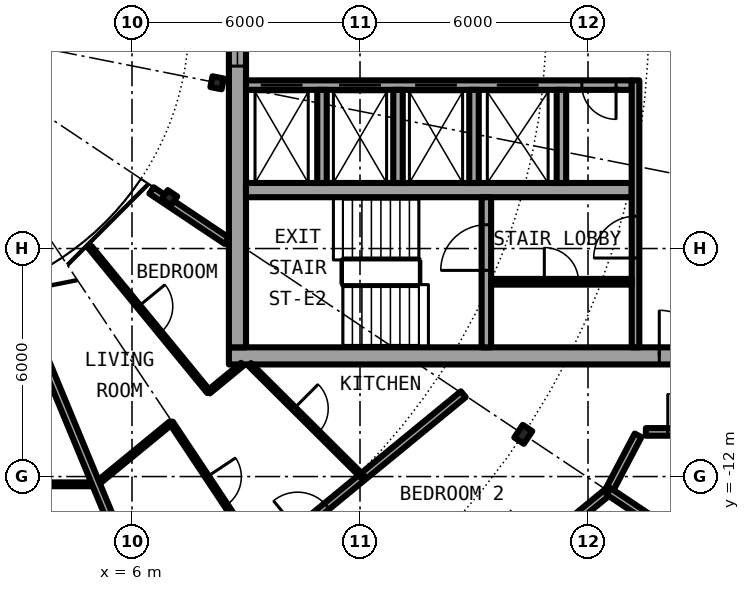
"""IFC4 building model, lengths in metres.
Left out: names, types, materials, properties, quantities, classifications, styles, units other than length and angle.
Written with IfcOpenShell. Run it as: python <this file> out.ifc"""

import sys

from ifc_helpers import new_model, si_unit, direction, frame, frame_2d, origin, origin_2d, place, context, subcontext, project, spatial, rectangle, i_section, extrude, element, fill, save


model = new_model("IFC4")
c1 = context("Model", 3, precision=1e-05, world=origin(), true_north=direction((0.0, 1.0)))
c2 = subcontext(c1, "Body", "Model", "MODEL_VIEW")
j1 = project(units=[si_unit("LENGTHUNIT", "METRE"), si_unit("PLANEANGLEUNIT", "RADIAN")], contexts=[c1])
p1 = place(None, origin())
s1 = spatial("IfcSite", under=j1, at=p1, CompositionType="ELEMENT")
p2 = place(p1, origin())
s2 = spatial("IfcBuilding", under=s1, at=p2, CompositionType="ELEMENT")
p3 = place(p2, frame((0.0, 0.0, 199.35)))
s3 = spatial("IfcBuildingStorey", under=s2, at=p3, CompositionType="ELEMENT", Elevation=199.35)
p4 = place(p3, frame((16.297, -10.889, 0.0), z_axis=(0.0, 0.0, 1.0), x_axis=(0.831469612303, -0.55557023302, 0.0)))
e1 = element("IfcColumn", 1, at=p4, inside=s3, PredefinedType="COLUMN", context=c2, shape_type="SweptSolid", body=[
    extrude(i_section(OverallWidth=0.3, OverallDepth=0.4, WebThickness=0.013, FlangeThickness=0.024, FilletRadius=0.027, at=origin_2d()), origin(), (0.0, 0.0, 1.0), 3.05),
])
for number, where, z_axis, x_axis in (
    (2, (6.984, -4.667, 0.0), (0.0, 0.0, 1.0), (0.831, -0.556, 0.0)),
    (3, (8.239, -1.639, 0.0), (0.0, 0.0, 1.0), (0.981, -0.195, 0.0)),
):
    element("IfcColumn", number, at=place(p3, frame(where, z_axis=z_axis, x_axis=x_axis)), inside=s3, PredefinedType="COLUMN", context=c2, shape_type="SweptSolid", body=[
        extrude(i_section(OverallWidth=0.3, OverallDepth=0.29, WebThickness=0.009, FlangeThickness=0.014, FilletRadius=0.027, at=origin_2d()), origin(), (0.0, 0.0, 1.0), 3.05),
    ])
p5 = place(p3, frame((8.55, -8.825, 0.0), z_axis=(0.0, 0.0, 1.0), x_axis=(1.0, 0.0, 0.0)))
e4 = element("IfcWall", 4, at=p5, inside=s3, PredefinedType="SHEAR", context=c2, shape_type="SweptSolid", body=[
    extrude(rectangle(XDim=13.5, YDim=0.45, at=frame_2d((6.75, 0.0))), origin(), (0.0, 0.0, 1.0), 3.05),
])
p6 = place(p5, frame((11.325, 0.0, 0.0)))
e5 = element("IfcOpeningElement", 5, at=p6, cuts=e4, PredefinedType="OPENING", context=c2, shape_type="SweptSolid", body=[
    extrude(rectangle(XDim=1.2, YDim=2.3, at=frame_2d((0.6, 1.15))), frame((0.0, 0.235, 0.0), z_axis=(0.0, -1.0, 0.0), x_axis=(1.0, 0.0, 0.0)), (0.0, 0.0, 1.0), 0.47),
])
p7 = place(p3, frame((8.775, -8.6, 0.0), z_axis=(0.0, 0.0, 1.0), x_axis=(0.0, 1.0, 0.0)))
e6 = element("IfcWall", 6, at=p7, inside=s3, PredefinedType="SHEAR", context=c2, shape_type="SweptSolid", body=[
    extrude(rectangle(XDim=17.2, YDim=0.45, at=frame_2d((8.6, 0.0))), origin(), (0.0, 0.0, 1.0), 3.05),
])
p8 = place(p7, frame((7.4, 0.0, 0.1)))
e7 = element("IfcOpeningElement", 7, at=p8, cuts=e6, PredefinedType="OPENING", context=c2, shape_type="SweptSolid", body=[
    extrude(rectangle(XDim=2.4, YDim=2.2, at=frame_2d((1.2, 1.1))), frame((0.0, 0.235, 0.0), z_axis=(0.0, -1.0, 0.0), x_axis=(1.0, 0.0, 0.0)), (0.0, 0.0, 1.0), 0.47),
])
p9 = place(p3, frame((19.15, -1.7, 0.0), z_axis=(0.0, 0.0, 1.0), x_axis=(-1.0, 0.0, 0.0)))
e8 = element("IfcWall", 8, at=p9, inside=s3, PredefinedType="SHEAR", context=c2, shape_type="SweptSolid", body=[
    extrude(rectangle(XDim=10.15, YDim=0.25, at=frame_2d((5.075, 0.0))), origin(), (0.0, 0.0, 1.0), 3.05),
])
p10 = place(p9, frame((8.663, 0.0, 0.0)))
e9 = element("IfcOpeningElement", 9, at=p10, cuts=e8, PredefinedType="OPENING", context=c2, shape_type="SweptSolid", body=[
    extrude(rectangle(XDim=1.1, YDim=2.3, at=frame_2d((0.55, 1.15))), frame((0.0, 0.135, 0.0), z_axis=(0.0, -1.0, 0.0), x_axis=(1.0, 0.0, 0.0)), (0.0, 0.0, 1.0), 0.27),
])
p11 = place(p9, frame((6.6, 0.0, 0.0)))
e10 = element("IfcOpeningElement", 10, at=p11, cuts=e8, PredefinedType="OPENING", context=c2, shape_type="SweptSolid", body=[
    extrude(rectangle(XDim=1.1, YDim=2.3, at=frame_2d((0.55, 1.15))), frame((0.0, 0.135, 0.0), z_axis=(0.0, -1.0, 0.0), x_axis=(1.0, 0.0, 0.0)), (0.0, 0.0, 1.0), 0.27),
])
p12 = place(p9, frame((4.6, 0.0, 0.0)))
e11 = element("IfcOpeningElement", 11, at=p12, cuts=e8, PredefinedType="OPENING", context=c2, shape_type="SweptSolid", body=[
    extrude(rectangle(XDim=1.1, YDim=2.3, at=frame_2d((0.55, 1.15))), frame((0.0, 0.135, 0.0), z_axis=(0.0, -1.0, 0.0), x_axis=(1.0, 0.0, 0.0)), (0.0, 0.0, 1.0), 0.27),
])
p13 = place(p9, frame((2.45, 0.0, 0.0)))
e12 = element("IfcOpeningElement", 12, at=p13, cuts=e8, PredefinedType="OPENING", context=c2, shape_type="SweptSolid", body=[
    extrude(rectangle(XDim=1.1, YDim=2.3, at=frame_2d((0.55, 1.15))), frame((0.0, 0.135, 0.0), z_axis=(0.0, -1.0, 0.0), x_axis=(1.0, 0.0, 0.0)), (0.0, 0.0, 1.0), 0.27),
])
p14 = place(p9, frame((0.413, 0.0, 0.0)))
e13 = element("IfcOpeningElement", 13, at=p14, cuts=e8, PredefinedType="OPENING", context=c2, shape_type="SweptSolid", body=[
    extrude(rectangle(XDim=0.9, YDim=2.3, at=frame_2d((0.45, 1.15))), frame((0.0, 0.135, 0.0), z_axis=(0.0, -1.0, 0.0), x_axis=(1.0, 0.0, 0.0)), (0.0, 0.0, 1.0), 0.27),
])
p15 = place(p3, frame((9.0, -4.462, 0.0), z_axis=(0.0, 0.0, 1.0), x_axis=(1.0, 0.0, 0.0)))
e14 = element("IfcWall", 14, at=p15, inside=s3, PredefinedType="SHEAR", context=c2, shape_type="SweptSolid", body=[
    extrude(rectangle(XDim=10.15, YDim=0.375, at=frame_2d((5.075, 0.0))), origin(), (0.0, 0.0, 1.0), 3.05),
])
p16 = place(p3, frame((15.325, -8.6, 0.0), z_axis=(0.0, 0.0, 1.0), x_axis=(0.0, 1.0, 0.0)))
e15 = element("IfcWall", 15, at=p16, inside=s3, PredefinedType="SHEAR", context=c2, shape_type="SweptSolid", body=[
    extrude(rectangle(XDim=3.95, YDim=0.25, at=frame_2d((1.975, 0.0))), origin(), (0.0, 0.0, 1.0), 3.05),
])
p17 = place(p16, frame((2.025, 0.0, 0.0)))
e16 = element("IfcOpeningElement", 16, at=p17, cuts=e15, PredefinedType="OPENING", context=c2, shape_type="SweptSolid", body=[
    extrude(rectangle(XDim=1.2, YDim=2.3, at=frame_2d((0.6, 1.15))), frame((0.0, 0.135, 0.0), z_axis=(0.0, -1.0, 0.0), x_axis=(1.0, 0.0, 0.0)), (0.0, 0.0, 1.0), 0.27),
])
for number, where, z_axis, x_axis in (
    (17, (15.0, -1.825, 0.0), (0.0, 0.0, 1.0), (0.0, -1.0, 0.0)),
    (18, (17.3, -1.825, 0.0), (0.0, 0.0, 1.0), (0.0, -1.0, 0.0)),
):
    element("IfcWall", number, at=place(p3, frame(where, z_axis=z_axis, x_axis=x_axis)), inside=s3, PredefinedType="SOLIDWALL", context=c2, shape_type="SweptSolid", body=[
        extrude(rectangle(XDim=2.45, YDim=0.25, at=frame_2d((1.225, 0.0))), origin(), (0.0, 0.0, 1.0), 2.7),
    ])
p18 = place(p3, frame((19.25, -8.6, 0.0), z_axis=(0.0, 0.0, 1.0), x_axis=(0.0, 1.0, 0.0)))
e19 = element("IfcWall", 19, at=p18, inside=s3, PredefinedType="SOLIDWALL", context=c2, shape_type="SweptSolid", body=[
    extrude(rectangle(XDim=7.025, YDim=0.2, at=frame_2d((3.513, 0.0))), origin(), (0.0, 0.0, 1.0), 2.7),
])
p19 = place(p18, frame((2.35, 0.0, 0.0)))
e20 = element("IfcOpeningElement", 20, at=p19, cuts=e19, PredefinedType="OPENING", context=c2, shape_type="SweptSolid", body=[
    extrude(rectangle(XDim=1.1, YDim=2.3, at=frame_2d((0.55, 1.15))), frame((0.0, 0.11, 0.0), z_axis=(0.0, -1.0, 0.0), x_axis=(1.0, 0.0, 0.0)), (0.0, 0.0, 1.0), 0.22),
])
for number, where, z_axis, x_axis in (
    (21, (11.0, -1.825, 0.0), (0.0, 0.0, 1.0), (0.0, -1.0, 0.0)),
    (22, (13.0, -1.825, 0.0), (0.0, 0.0, 1.0), (0.0, -1.0, 0.0)),
):
    element("IfcWall", number, at=place(p3, frame(where, z_axis=z_axis, x_axis=x_axis)), inside=s3, PredefinedType="SOLIDWALL", context=c2, shape_type="SweptSolid", body=[
        extrude(rectangle(XDim=2.45, YDim=0.25, at=frame_2d((1.225, 0.0))), origin(), (0.0, 0.0, 1.0), 2.7),
    ])
p20 = place(p3, frame((15.45, -6.875, 0.0), z_axis=(0.0, 0.0, 1.0), x_axis=(1.0, 0.0, 0.0)))
e23 = element("IfcWall", 23, at=p20, inside=s3, PredefinedType="PARTITIONING", context=c2, shape_type="SweptSolid", body=[
    extrude(rectangle(XDim=3.7, YDim=0.15, at=frame_2d((1.85, 0.0))), origin(), (0.0, 0.0, 1.0), 2.7),
])
p21 = place(p20, frame((1.4, 0.0, 0.0)))
e24 = element("IfcOpeningElement", 24, at=p21, cuts=e23, PredefinedType="OPENING", context=c2, shape_type="SweptSolid", body=[
    extrude(rectangle(XDim=0.9, YDim=2.3, at=frame_2d((0.45, 1.15))), frame((0.0, 0.085, 0.0), z_axis=(0.0, -1.0, 0.0), x_axis=(1.0, 0.0, 0.0)), (0.0, 0.0, 1.0), 0.17),
])
p22 = place(p3, frame((18.542, -12.389, 0.0), z_axis=(0.0, 0.0, 1.0), x_axis=(0.465359652486, 0.885121683068, 0.0)))
e25 = element("IfcWall", 25, at=p22, inside=s3, PredefinedType="PARTITIONING", context=c2, shape_type="SweptSolid", body=[
    extrude(rectangle(XDim=1.665, YDim=0.2, at=frame_2d((0.833, 0.0))), origin(), (0.0, 0.0, 1.0), 2.7),
])
p23 = place(p3, frame((8.534, -20.603, 0.0), z_axis=(0.0, 0.0, 1.0), x_axis=(0.772983503654, 0.634426121056, 0.0)))
e26 = element("IfcWall", 26, at=p23, inside=s3, PredefinedType="PARTITIONING", context=c2, shape_type="SweptSolid", body=[
    extrude(rectangle(XDim=12.947, YDim=0.2, at=frame_2d((6.474, 0.0))), origin(), (0.0, 0.0, 1.0), 2.7),
])
p24 = place(p23, frame((7.053, 0.0, 0.0)))
e27 = element("IfcOpeningElement", 27, at=p24, cuts=e26, PredefinedType="OPENING", context=c2, shape_type="SweptSolid", body=[
    extrude(rectangle(XDim=1.0, YDim=2.3, at=frame_2d((0.5, 1.15))), frame((0.0, 0.11, 0.0), z_axis=(0.0, -1.0, 0.0), x_axis=(1.0, 0.0, 0.0)), (0.0, 0.0, 1.0), 0.22),
])
p25 = place(p3, frame((6.773, -16.353, 0.0), z_axis=(0.0, 0.0, 1.0), x_axis=(0.773034536097, 0.634363938131, 0.0)))
e28 = element("IfcWall", 28, at=p25, inside=s3, PredefinedType="PARTITIONING", context=c2, shape_type="SweptSolid", body=[
    extrude(rectangle(XDim=10.277, YDim=0.2, at=frame_2d((5.138, 0.0))), origin(), (0.0, 0.0, 1.0), 2.7),
])
p26 = place(p25, frame((4.638, 0.0, 0.0)))
e29 = element("IfcOpeningElement", 29, at=p26, cuts=e28, PredefinedType="OPENING", context=c2, shape_type="SweptSolid", body=[
    extrude(rectangle(XDim=1.0, YDim=2.3, at=frame_2d((0.5, 1.15))), frame((0.0, 0.11, 0.0), z_axis=(0.0, -1.0, 0.0), x_axis=(1.0, 0.0, 0.0)), (0.0, 0.0, 1.0), 0.22),
])
p27 = place(p3, frame((5.055, -12.204, 0.0), z_axis=(0.0, 0.0, 1.0), x_axis=(0.772943675046, 0.634474645046, 0.0)))
e30 = element("IfcWall", 30, at=p27, inside=s3, PredefinedType="PARTITIONING", context=c2, shape_type="SweptSolid", body=[
    extrude(rectangle(XDim=2.557, YDim=0.1, at=frame_2d((1.278, 0.0))), origin(), (0.0, 0.0, 1.0), 2.7),
])
p28 = place(p3, frame((8.017, -9.773, 0.0), z_axis=(0.0, 0.0, 1.0), x_axis=(0.772786083133, 0.634666581534, 0.0)))
e31 = element("IfcWall", 31, at=p28, inside=s3, PredefinedType="PARTITIONING", context=c2, shape_type="SweptSolid", body=[
    extrude(rectangle(XDim=1.144, YDim=0.1, at=frame_2d((0.572, 0.0))), origin(), (0.0, 0.0, 1.0), 2.7),
])
p29 = place(p3, frame((2.527, -12.204, 0.0), z_axis=(0.0, 0.0, 1.0), x_axis=(1.0, 0.0, 0.0)))
e32 = element("IfcWall", 32, at=p29, inside=s3, PredefinedType="PARTITIONING", context=c2, shape_type="SweptSolid", body=[
    extrude(rectangle(XDim=2.528, YDim=0.1, at=frame_2d((1.264, 0.0))), origin(), (0.0, 0.0, 1.0), 2.7),
])
p30 = place(p3, frame((19.523, -10.825, 0.0), z_axis=(0.0, 0.0, 1.0), x_axis=(1.0, 0.0, 0.0)))
e33 = element("IfcWall", 33, at=p30, inside=s3, PredefinedType="PARTITIONING", context=c2, shape_type="SweptSolid", body=[
    extrude(rectangle(XDim=2.152, YDim=0.2, at=frame_2d((1.076, 0.0))), origin(), (0.0, 0.0, 1.0), 2.7),
])
p31 = place(p30, frame((0.576, 0.0, 0.0)))
e34 = element("IfcOpeningElement", 34, at=p31, cuts=e33, PredefinedType="OPENING", context=c2, shape_type="SweptSolid", body=[
    extrude(rectangle(XDim=1.0, YDim=2.3, at=frame_2d((0.5, 1.15))), frame((0.0, 0.11, 0.0), z_axis=(0.0, -1.0, 0.0), x_axis=(1.0, 0.0, 0.0)), (0.0, 0.0, 1.0), 0.22),
])
p32 = place(p3, frame((6.513, -4.472, 0.0), z_axis=(0.0, 0.0, 1.0), x_axis=(0.831403409976, -0.555669299026, 0.0)))
e35 = element("IfcWall", 35, at=p32, inside=s3, PredefinedType="PARTITIONING", context=c2, shape_type="SweptSolid", body=[
    extrude(rectangle(XDim=2.383, YDim=0.2, at=frame_2d((1.191, 0.0))), origin(), (0.0, 0.0, 1.0), 2.7),
])
p33 = place(p3, frame((2.954, -7.132, 0.0), z_axis=(0.0, 0.0, 1.0), x_axis=(0.382716169203, -0.92386597179, 0.0)))
e36 = element("IfcWall", 36, at=p33, inside=s3, PredefinedType="PARTITIONING", context=c2, shape_type="SweptSolid", body=[
    extrude(rectangle(XDim=9.981, YDim=0.2, at=frame_2d((4.99, 0.0))), origin(), (0.0, 0.0, 1.0), 2.7),
])
p34 = place(p3, frame((4.898, -5.968, 0.0), z_axis=(0.0, 0.0, 1.0), x_axis=(0.634401778971, -0.773003481776, 0.0)))
e37 = element("IfcWall", 37, at=p34, inside=s3, PredefinedType="PARTITIONING", context=c2, shape_type="SweptSolid", body=[
    extrude(rectangle(XDim=4.92, YDim=0.1, at=frame_2d((2.46, 0.0))), origin(), (0.0, 0.0, 1.0), 2.7),
])
p35 = place(p34, frame((2.01, 0.0, 0.0)))
e38 = element("IfcOpeningElement", 38, at=p35, cuts=e37, PredefinedType="OPENING", context=c2, shape_type="SweptSolid", body=[
    extrude(rectangle(XDim=0.9, YDim=2.3, at=frame_2d((0.45, 1.15))), frame((0.0, 0.06, 0.0), z_axis=(0.0, -1.0, 0.0), x_axis=(1.0, 0.0, 0.0)), (0.0, 0.0, 1.0), 0.12),
])
p36 = place(p3, frame((7.031, -10.582, 0.0), z_axis=(0.0, 0.0, 1.0), x_axis=(0.553303732327, -0.832979579457, 0.0)))
e39 = element("IfcWall", 39, at=p36, inside=s3, PredefinedType="PARTITIONING", context=c2, shape_type="SweptSolid", body=[
    extrude(rectangle(XDim=4.319, YDim=0.1, at=frame_2d((2.16, 0.0))), origin(), (0.0, 0.0, 1.0), 2.7),
])
p37 = place(p36, frame((1.71, 0.0, 0.0)))
e40 = element("IfcOpeningElement", 40, at=p37, cuts=e39, PredefinedType="OPENING", context=c2, shape_type="SweptSolid", body=[
    extrude(rectangle(XDim=0.9, YDim=2.3, at=frame_2d((0.45, 1.15))), frame((0.0, 0.06, 0.0), z_axis=(0.0, -1.0, 0.0), x_axis=(1.0, 0.0, 0.0)), (0.0, 0.0, 1.0), 0.12),
])
p38 = place(p3, frame((9.097, -9.05, 0.0), z_axis=(0.0, 0.0, 1.0), x_axis=(0.708909651863, -0.705299302067, 0.0)))
e41 = element("IfcWall", 41, at=p38, inside=s3, PredefinedType="PARTITIONING", context=c2, shape_type="SweptSolid", body=[
    extrude(rectangle(XDim=4.193, YDim=0.1, at=frame_2d((2.096, 0.0))), origin(), (0.0, 0.0, 1.0), 2.7),
])
p39 = place(p38, frame((1.646, 0.0, 0.0)))
e42 = element("IfcOpeningElement", 42, at=p39, cuts=e41, PredefinedType="OPENING", context=c2, shape_type="SweptSolid", body=[
    extrude(rectangle(XDim=0.9, YDim=2.3, at=frame_2d((0.45, 1.15))), frame((0.0, 0.06, 0.0), z_axis=(0.0, -1.0, 0.0), x_axis=(1.0, 0.0, 0.0)), (0.0, 0.0, 1.0), 0.12),
])
p40 = place(p3, frame((18.542, -12.389, 0.0), z_axis=(0.0, 0.0, 1.0), x_axis=(0.831387096605, -0.55569370664, 0.0)))
e43 = element("IfcWall", 43, at=p40, inside=s3, PredefinedType="PARTITIONING", context=c2, shape_type="SweptSolid", body=[
    extrude(rectangle(XDim=4.875, YDim=0.2, at=frame_2d((2.438, 0.0))), origin(), (0.0, 0.0, 1.0), 2.7),
])
p41 = place(p10, origin())
e44 = element("IfcDoor", 44, at=p41, inside=s3, OperationType="DOUBLE_DOOR_SLIDING", PredefinedType="DOOR", context=c2, shape_type="SweptSolid", body=[
    extrude(rectangle(XDim=1.1, YDim=2.3, at=frame_2d((0.55, 1.15))), frame((0.0, 0.025, 0.0), z_axis=(0.0, -1.0, 0.0), x_axis=(1.0, 0.0, 0.0)), (0.0, 0.0, 1.0), 0.05),
])
fill(e9, e44)
p42 = place(p11, origin())
e45 = element("IfcDoor", 45, at=p42, inside=s3, OperationType="DOUBLE_DOOR_SLIDING", PredefinedType="DOOR", context=c2, shape_type="SweptSolid", body=[
    extrude(rectangle(XDim=1.1, YDim=2.3, at=frame_2d((0.55, 1.15))), frame((0.0, 0.025, 0.0), z_axis=(0.0, -1.0, 0.0), x_axis=(1.0, 0.0, 0.0)), (0.0, 0.0, 1.0), 0.05),
])
fill(e10, e45)
p43 = place(p12, origin())
e46 = element("IfcDoor", 46, at=p43, inside=s3, OperationType="DOUBLE_DOOR_SLIDING", PredefinedType="DOOR", context=c2, shape_type="SweptSolid", body=[
    extrude(rectangle(XDim=1.1, YDim=2.3, at=frame_2d((0.55, 1.15))), frame((0.0, 0.025, 0.0), z_axis=(0.0, -1.0, 0.0), x_axis=(1.0, 0.0, 0.0)), (0.0, 0.0, 1.0), 0.05),
])
fill(e11, e46)
p44 = place(p13, origin())
e47 = element("IfcDoor", 47, at=p44, inside=s3, OperationType="DOUBLE_DOOR_SLIDING", PredefinedType="DOOR", context=c2, shape_type="SweptSolid", body=[
    extrude(rectangle(XDim=1.1, YDim=2.3, at=frame_2d((0.55, 1.15))), frame((0.0, 0.025, 0.0), z_axis=(0.0, -1.0, 0.0), x_axis=(1.0, 0.0, 0.0)), (0.0, 0.0, 1.0), 0.05),
])
fill(e12, e47)
p45 = place(p14, origin())
e48 = element("IfcDoor", 48, at=p45, inside=s3, OperationType="SINGLE_SWING_RIGHT", PredefinedType="DOOR", context=c2, shape_type="SweptSolid", body=[
    extrude(rectangle(XDim=0.9, YDim=2.3, at=frame_2d((0.45, 1.15))), frame((0.0, 0.025, 0.0), z_axis=(0.0, -1.0, 0.0), x_axis=(1.0, 0.0, 0.0)), (0.0, 0.0, 1.0), 0.05),
])
fill(e13, e48)
p46 = place(p21, origin())
e49 = element("IfcDoor", 49, at=p46, inside=s3, OperationType="SINGLE_SWING_LEFT", PredefinedType="DOOR", context=c2, shape_type="SweptSolid", body=[
    extrude(rectangle(XDim=0.9, YDim=2.3, at=frame_2d((0.45, 1.15))), frame((0.0, 0.025, 0.0), z_axis=(0.0, -1.0, 0.0), x_axis=(1.0, 0.0, 0.0)), (0.0, 0.0, 1.0), 0.05),
])
fill(e24, e49)
p47 = place(p17, origin())
e50 = element("IfcDoor", 50, at=p47, inside=s3, OperationType="SINGLE_SWING_LEFT", PredefinedType="DOOR", context=c2, shape_type="SweptSolid", body=[
    extrude(rectangle(XDim=1.2, YDim=2.3, at=frame_2d((0.6, 1.15))), frame((0.0, 0.025, 0.0), z_axis=(0.0, -1.0, 0.0), x_axis=(1.0, 0.0, 0.0)), (0.0, 0.0, 1.0), 0.05),
])
fill(e16, e50)
p48 = place(p19, origin())
e51 = element("IfcDoor", 51, at=p48, inside=s3, OperationType="SINGLE_SWING_RIGHT", PredefinedType="DOOR", context=c2, shape_type="SweptSolid", body=[
    extrude(rectangle(XDim=1.1, YDim=2.3, at=frame_2d((0.55, 1.15))), frame((0.0, 0.025, 0.0), z_axis=(0.0, -1.0, 0.0), x_axis=(1.0, 0.0, 0.0)), (0.0, 0.0, 1.0), 0.05),
])
fill(e20, e51)
p49 = place(p6, origin())
e52 = element("IfcDoor", 52, at=p49, inside=s3, OperationType="SINGLE_SWING_LEFT", PredefinedType="DOOR", context=c2, shape_type="SweptSolid", body=[
    extrude(rectangle(XDim=1.2, YDim=2.3, at=frame_2d((0.6, 1.15))), frame((0.0, 0.025, 0.0), z_axis=(0.0, -1.0, 0.0), x_axis=(1.0, 0.0, 0.0)), (0.0, 0.0, 1.0), 0.05),
])
fill(e5, e52)
p50 = place(p8, origin())
e53 = element("IfcWindow", 53, at=p50, inside=s3, PartitioningType="SINGLE_PANEL", PredefinedType="WINDOW", context=c2, shape_type="SweptSolid", body=[
    extrude(rectangle(XDim=2.4, YDim=2.2, at=frame_2d((1.2, 1.1))), frame((0.0, 0.03, 0.0), z_axis=(0.0, -1.0, 0.0), x_axis=(1.0, 0.0, 0.0)), (0.0, 0.0, 1.0), 0.06),
])
fill(e7, e53)
p51 = place(p26, origin())
e54 = element("IfcDoor", 54, at=p51, inside=s3, OperationType="SINGLE_SWING_RIGHT", PredefinedType="DOOR", context=c2, shape_type="SweptSolid", body=[
    extrude(rectangle(XDim=1.0, YDim=2.3, at=frame_2d((0.5, 1.15))), frame((0.0, 0.025, 0.0), z_axis=(0.0, -1.0, 0.0), x_axis=(1.0, 0.0, 0.0)), (0.0, 0.0, 1.0), 0.05),
])
fill(e29, e54)
p52 = place(p37, origin())
e55 = element("IfcDoor", 55, at=p52, inside=s3, OperationType="SINGLE_SWING_RIGHT", PredefinedType="DOOR", context=c2, shape_type="SweptSolid", body=[
    extrude(rectangle(XDim=0.9, YDim=2.3, at=frame_2d((0.45, 1.15))), frame((0.0, 0.025, 0.0), z_axis=(0.0, -1.0, 0.0), x_axis=(1.0, 0.0, 0.0)), (0.0, 0.0, 1.0), 0.05),
])
fill(e40, e55)
p53 = place(p39, origin())
e56 = element("IfcDoor", 56, at=p53, inside=s3, OperationType="SINGLE_SWING_RIGHT", PredefinedType="DOOR", context=c2, shape_type="SweptSolid", body=[
    extrude(rectangle(XDim=0.9, YDim=2.3, at=frame_2d((0.45, 1.15))), frame((0.0, 0.025, 0.0), z_axis=(0.0, -1.0, 0.0), x_axis=(1.0, 0.0, 0.0)), (0.0, 0.0, 1.0), 0.05),
])
fill(e42, e56)
p54 = place(p35, origin())
e57 = element("IfcDoor", 57, at=p54, inside=s3, OperationType="SINGLE_SWING_RIGHT", PredefinedType="DOOR", context=c2, shape_type="SweptSolid", body=[
    extrude(rectangle(XDim=0.9, YDim=2.3, at=frame_2d((0.45, 1.15))), frame((0.0, 0.025, 0.0), z_axis=(0.0, -1.0, 0.0), x_axis=(1.0, 0.0, 0.0)), (0.0, 0.0, 1.0), 0.05),
])
fill(e38, e57)
p55 = place(p31, origin())
e58 = element("IfcDoor", 58, at=p55, inside=s3, OperationType="SINGLE_SWING_LEFT", PredefinedType="DOOR", context=c2, shape_type="SweptSolid", body=[
    extrude(rectangle(XDim=1.0, YDim=2.3, at=frame_2d((0.5, 1.15))), frame((0.0, 0.025, 0.0), z_axis=(0.0, -1.0, 0.0), x_axis=(1.0, 0.0, 0.0)), (0.0, 0.0, 1.0), 0.05),
])
fill(e34, e58)
save(model, sys.argv[1])
